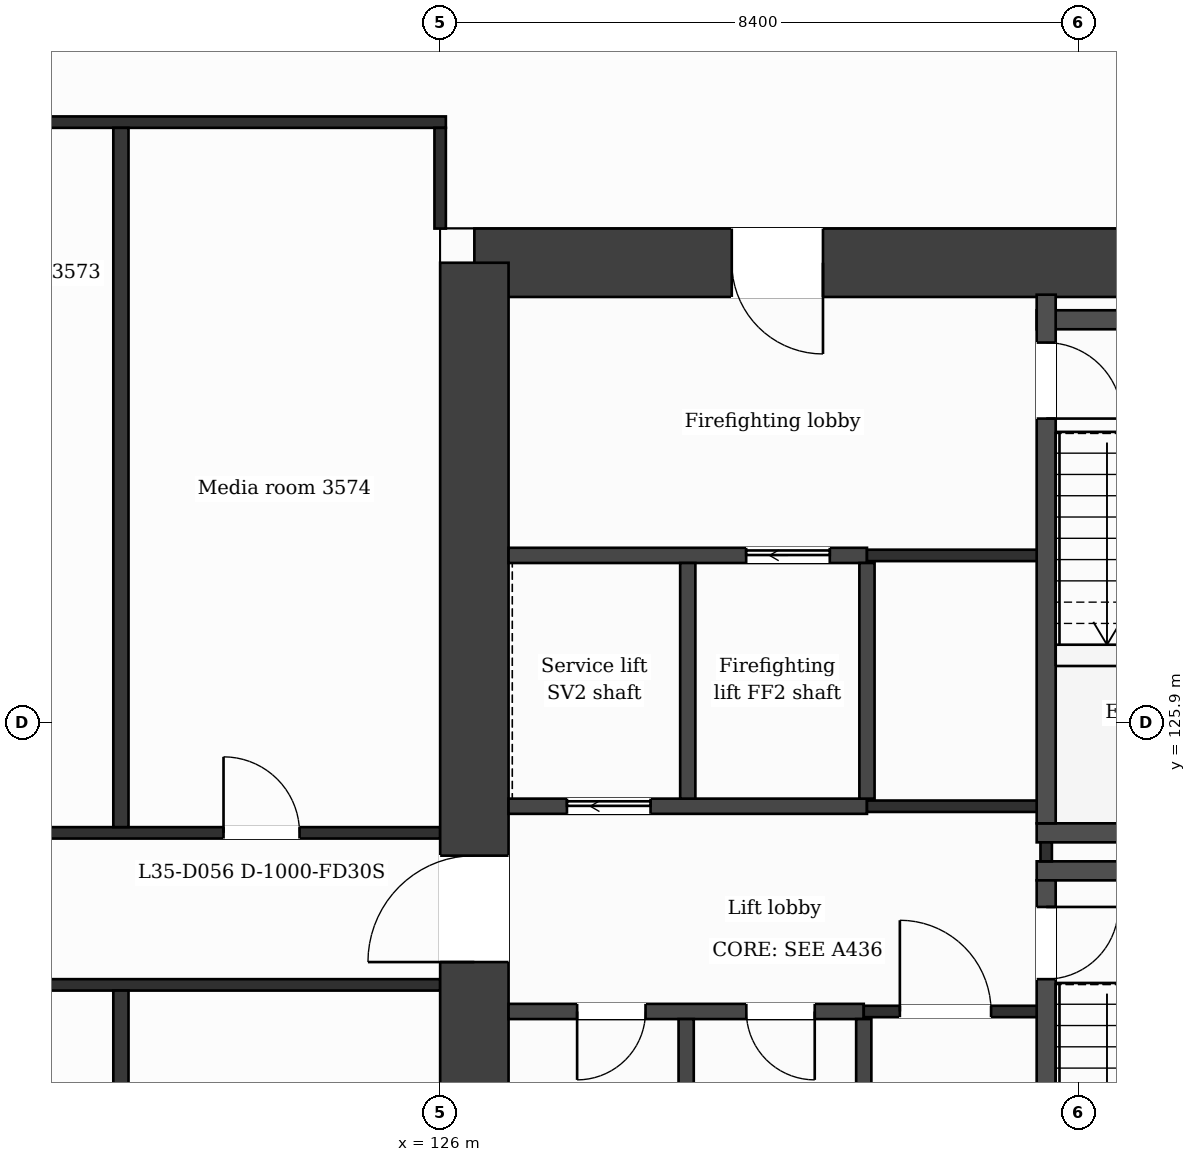
"""IFC4 building model, lengths in metres.
Left out: names, types, materials, properties, quantities, classifications, styles, units other than length and angle.
Written with IfcOpenShell. Run it as: python <this file> out.ifc"""

import sys

from ifc_helpers import new_model, si_unit, direction, frame, frame_2d, origin, place, context, subcontext, project, spatial, rectangle, extrude, element, fill, save


model = new_model("IFC4")
c1 = context("Model", 3, precision=1e-05, world=origin(), true_north=direction((0.0, 1.0)))
c2 = subcontext(c1, "Body", "Model", "MODEL_VIEW")
j1 = project(units=[si_unit("LENGTHUNIT", "METRE"), si_unit("PLANEANGLEUNIT", "RADIAN")], contexts=[c1])
p1 = place(None, origin())
s1 = spatial("IfcSite", under=j1, at=p1, CompositionType="ELEMENT")
p2 = place(p1, origin())
s2 = spatial("IfcBuilding", under=s1, at=p2, CompositionType="ELEMENT")
p3 = place(p2, frame((0.0, 0.0, 151.5)))
s3 = spatial("IfcBuildingStorey", under=s2, at=p3, CompositionType="ELEMENT", Elevation=151.5)
p4 = place(p3, frame((126.45, 131.95, 0.0), z_axis=(0.0, 0.0, 1.0), x_axis=(1.0, 0.0, 0.0)))
e1 = element("IfcWall", 1, at=p4, inside=s3, PredefinedType="SHEAR", context=c2, shape_type="SweptSolid", body=[
    extrude(rectangle(XDim=11.326, YDim=0.9, at=frame_2d((5.663, 0.0))), origin(), (0.0, 0.0, 1.0), 3.7),
])
p5 = place(p4, frame((3.386, 0.0, 0.0)))
e2 = element("IfcOpeningElement", 2, at=p5, cuts=e1, PredefinedType="OPENING", context=c2, shape_type="SweptSolid", body=[
    extrude(rectangle(XDim=1.2, YDim=2.1, at=frame_2d((0.6, 1.05))), frame((0.0, 0.46, 0.0), z_axis=(0.0, -1.0, 0.0), x_axis=(1.0, 0.0, 0.0)), (0.0, 0.0, 1.0), 0.92),
])
p6 = place(p3, frame((126.45, 110.85, 0.0), z_axis=(0.0, 0.0, 1.0), x_axis=(0.0, 1.0, 0.0)))
e3 = element("IfcWall", 3, at=p6, inside=s3, PredefinedType="SHEAR", context=c2, shape_type="SweptSolid", body=[
    extrude(rectangle(XDim=21.1, YDim=0.9, at=frame_2d((10.55, 0.0))), origin(), (0.0, 0.0, 1.0), 3.7),
])
p7 = place(p6, frame((11.9, 0.0, 0.0)))
e4 = element("IfcOpeningElement", 4, at=p7, cuts=e3, PredefinedType="OPENING", context=c2, shape_type="SweptSolid", body=[
    extrude(rectangle(XDim=1.4, YDim=2.1, at=frame_2d((0.7, 1.05))), frame((0.0, 0.46, 0.0), z_axis=(0.0, -1.0, 0.0), x_axis=(1.0, 0.0, 0.0)), (0.0, 0.0, 1.0), 0.92),
])
p8 = place(p3, frame((126.9, 122.1, 0.0), z_axis=(0.0, 0.0, 1.0), x_axis=(1.0, 0.0, 0.0)))
e5 = element("IfcWall", 5, at=p8, inside=s3, PredefinedType="PARTITIONING", context=c2, shape_type="SweptSolid", body=[
    extrude(rectangle(XDim=4.673, YDim=0.2, at=frame_2d((2.336, 0.0))), origin(), (0.0, 0.0, 1.0), 3.38),
])
p9 = place(p8, frame((3.128, 0.0, 0.0)))
e6 = element("IfcOpeningElement", 6, at=p9, cuts=e5, PredefinedType="OPENING", context=c2, shape_type="SweptSolid", body=[
    extrude(rectangle(XDim=0.9, YDim=2.1, at=frame_2d((0.45, 1.05))), frame((0.0, 0.11, 0.0), z_axis=(0.0, -1.0, 0.0), x_axis=(1.0, 0.0, 0.0)), (0.0, 0.0, 1.0), 0.22),
])
p10 = place(p8, frame((0.902, 0.0, 0.0)))
e7 = element("IfcOpeningElement", 7, at=p10, cuts=e5, PredefinedType="OPENING", context=c2, shape_type="SweptSolid", body=[
    extrude(rectangle(XDim=0.9, YDim=2.1, at=frame_2d((0.45, 1.05))), frame((0.0, 0.11, 0.0), z_axis=(0.0, -1.0, 0.0), x_axis=(1.0, 0.0, 0.0)), (0.0, 0.0, 1.0), 0.22),
])
p11 = place(p3, frame((131.573, 122.1, 0.0), z_axis=(0.0, 0.0, 1.0), x_axis=(1.0, 0.0, 0.0)))
e8 = element("IfcWall", 8, at=p11, inside=s3, PredefinedType="PARTITIONING", context=c2, shape_type="SweptSolid", body=[
    extrude(rectangle(XDim=2.4, YDim=0.15, at=frame_2d((1.2, 0.0))), origin(), (0.0, 0.0, 1.0), 3.38),
])
p12 = place(p11, frame((0.475, 0.0, 0.0)))
e9 = element("IfcOpeningElement", 9, at=p12, cuts=e8, PredefinedType="OPENING", context=c2, shape_type="SweptSolid", body=[
    extrude(rectangle(XDim=1.2, YDim=2.1, at=frame_2d((0.6, 1.05))), frame((0.0, 0.085, 0.0), z_axis=(0.0, -1.0, 0.0), x_axis=(1.0, 0.0, 0.0)), (0.0, 0.0, 1.0), 0.17),
])
p13 = place(p3, frame((100.8, 122.45, 0.0), z_axis=(0.0, 0.0, 1.0), x_axis=(1.0, 0.0, 0.0)))
e10 = element("IfcWall", 10, at=p13, inside=s3, PredefinedType="PARTITIONING", context=c2, shape_type="SweptSolid", body=[
    extrude(rectangle(XDim=25.2, YDim=0.15, at=frame_2d((12.6, 0.0))), origin(), (0.0, 0.0, 1.0), 3.38),
])
for number, where, z_axis, x_axis in (
    (11, (133.848, 123.95, 0.0), (0.0, 0.0, 1.0), (1.0, 0.0, 0.0)),
    (12, (133.848, 124.45, 0.0), (0.0, 0.0, 1.0), (1.0, 0.0, 0.0)),
):
    element("IfcWall", number, at=place(p3, frame(where, z_axis=z_axis, x_axis=x_axis)), inside=s3, PredefinedType="PARTITIONING", context=c2, shape_type="SweptSolid", body=[
        extrude(rectangle(XDim=3.4, YDim=0.25, at=frame_2d((1.7, 0.0))), origin(), (0.0, 0.0, 1.0), 3.38),
    ])
p14 = place(p3, frame((100.8, 124.45, 0.0), z_axis=(0.0, 0.0, 1.0), x_axis=(1.0, 0.0, 0.0)))
e13 = element("IfcWall", 13, at=p14, inside=s3, PredefinedType="PARTITIONING", context=c2, shape_type="SweptSolid", body=[
    extrude(rectangle(XDim=25.2, YDim=0.15, at=frame_2d((12.6, 0.0))), origin(), (0.0, 0.0, 1.0), 3.38),
])
p15 = place(p14, frame((3.03, 0.0, 0.0)))
e14 = element("IfcOpeningElement", 14, at=p15, cuts=e13, PredefinedType="OPENING", context=c2, shape_type="SweptSolid", body=[
    extrude(rectangle(XDim=1.0, YDim=2.1, at=frame_2d((0.5, 1.05))), frame((0.0, 0.085, 0.0), z_axis=(0.0, -1.0, 0.0), x_axis=(1.0, 0.0, 0.0)), (0.0, 0.0, 1.0), 0.17),
])
p16 = place(p14, frame((12.77, 0.0, 0.0)))
e15 = element("IfcOpeningElement", 15, at=p16, cuts=e13, PredefinedType="OPENING", context=c2, shape_type="SweptSolid", body=[
    extrude(rectangle(XDim=1.0, YDim=2.1, at=frame_2d((0.5, 1.05))), frame((0.0, 0.085, 0.0), z_axis=(0.0, -1.0, 0.0), x_axis=(1.0, 0.0, 0.0)), (0.0, 0.0, 1.0), 0.17),
])
p17 = place(p14, frame((17.67, 0.0, 0.0)))
e16 = element("IfcOpeningElement", 16, at=p17, cuts=e13, PredefinedType="OPENING", context=c2, shape_type="SweptSolid", body=[
    extrude(rectangle(XDim=1.0, YDim=2.1, at=frame_2d((0.5, 1.05))), frame((0.0, 0.085, 0.0), z_axis=(0.0, -1.0, 0.0), x_axis=(1.0, 0.0, 0.0)), (0.0, 0.0, 1.0), 0.17),
])
p18 = place(p14, frame((22.35, 0.0, 0.0)))
e17 = element("IfcOpeningElement", 17, at=p18, cuts=e13, PredefinedType="OPENING", context=c2, shape_type="SweptSolid", body=[
    extrude(rectangle(XDim=1.0, YDim=2.1, at=frame_2d((0.5, 1.05))), frame((0.0, 0.085, 0.0), z_axis=(0.0, -1.0, 0.0), x_axis=(1.0, 0.0, 0.0)), (0.0, 0.0, 1.0), 0.17),
])
p19 = place(p3, frame((126.9, 124.8, 0.0), z_axis=(0.0, 0.0, 1.0), x_axis=(1.0, 0.0, 0.0)))
e18 = element("IfcWall", 18, at=p19, inside=s3, PredefinedType="PARTITIONING", context=c2, shape_type="SweptSolid", body=[
    extrude(rectangle(XDim=4.715, YDim=0.2, at=frame_2d((2.358, 0.0))), origin(), (0.0, 0.0, 1.0), 3.38),
])
p20 = place(p19, frame((0.768, 0.0, 0.0)))
e19 = element("IfcOpeningElement", 19, at=p20, cuts=e18, PredefinedType="OPENING", context=c2, shape_type="SweptSolid", body=[
    extrude(rectangle(XDim=1.1, YDim=2.1, at=frame_2d((0.55, 1.05))), frame((0.0, 0.11, 0.0), z_axis=(0.0, -1.0, 0.0), x_axis=(1.0, 0.0, 0.0)), (0.0, 0.0, 1.0), 0.22),
])
p21 = place(p3, frame((131.615, 124.8, 0.0), z_axis=(0.0, 0.0, 1.0), x_axis=(1.0, 0.0, 0.0)))
e20 = element("IfcWall", 20, at=p21, inside=s3, PredefinedType="PARTITIONING", context=c2, shape_type="SweptSolid", body=[
    extrude(rectangle(XDim=2.483, YDim=0.15, at=frame_2d((1.241, 0.0))), origin(), (0.0, 0.0, 1.0), 3.38),
])
p22 = place(p3, frame((126.9, 128.1, 0.0), z_axis=(0.0, 0.0, 1.0), x_axis=(1.0, 0.0, 0.0)))
e21 = element("IfcWall", 21, at=p22, inside=s3, PredefinedType="PARTITIONING", context=c2, shape_type="SweptSolid", body=[
    extrude(rectangle(XDim=4.715, YDim=0.2, at=frame_2d((2.358, 0.0))), origin(), (0.0, 0.0, 1.0), 3.38),
])
p23 = place(p22, frame((3.126, 0.0, 0.0)))
e22 = element("IfcOpeningElement", 22, at=p23, cuts=e21, PredefinedType="OPENING", context=c2, shape_type="SweptSolid", body=[
    extrude(rectangle(XDim=1.1, YDim=2.1, at=frame_2d((0.55, 1.05))), frame((0.0, 0.11, 0.0), z_axis=(0.0, -1.0, 0.0), x_axis=(1.0, 0.0, 0.0)), (0.0, 0.0, 1.0), 0.22),
])
p24 = place(p3, frame((131.615, 128.1, 0.0), z_axis=(0.0, 0.0, 1.0), x_axis=(1.0, 0.0, 0.0)))
e23 = element("IfcWall", 23, at=p24, inside=s3, PredefinedType="PARTITIONING", context=c2, shape_type="SweptSolid", body=[
    extrude(rectangle(XDim=2.358, YDim=0.15, at=frame_2d((1.179, 0.0))), origin(), (0.0, 0.0, 1.0), 3.38),
])
p25 = place(p3, frame((133.848, 131.2, 0.0), z_axis=(0.0, 0.0, 1.0), x_axis=(1.0, 0.0, 0.0)))
e24 = element("IfcWall", 24, at=p25, inside=s3, PredefinedType="PARTITIONING", context=c2, shape_type="SweptSolid", body=[
    extrude(rectangle(XDim=3.605, YDim=0.25, at=frame_2d((1.802, 0.0))), origin(), (0.0, 0.0, 1.0), 3.38),
])
p26 = place(p3, frame((100.725, 133.8, 0.0), z_axis=(0.0, 0.0, 1.0), x_axis=(1.0, 0.0, 0.0)))
e25 = element("IfcWall", 25, at=p26, inside=s3, PredefinedType="PARTITIONING", context=c2, shape_type="SweptSolid", body=[
    extrude(rectangle(XDim=25.35, YDim=0.15, at=frame_2d((12.675, 0.0))), origin(), (0.0, 0.0, 1.0), 3.38),
])
p27 = place(p26, frame((17.85, 0.0, 0.0)))
e26 = element("IfcOpeningElement", 26, at=p27, cuts=e25, PredefinedType="OPENING", context=c2, shape_type="SweptSolid", body=[
    extrude(rectangle(XDim=1.0, YDim=2.1, at=frame_2d((0.5, 1.05))), frame((0.0, 0.085, 0.0), z_axis=(0.0, -1.0, 0.0), x_axis=(1.0, 0.0, 0.0)), (0.0, 0.0, 1.0), 0.17),
])
p28 = place(p3, frame((121.8, 109.075, 0.0), z_axis=(0.0, 0.0, 1.0), x_axis=(0.0, 1.0, 0.0)))
e27 = element("IfcWall", 27, at=p28, inside=s3, PredefinedType="PARTITIONING", context=c2, shape_type="SweptSolid", body=[
    extrude(rectangle(XDim=13.3, YDim=0.2, at=frame_2d((6.65, 0.0))), origin(), (0.0, 0.0, 1.0), 3.38),
])
p29 = place(p3, frame((121.8, 124.525, 0.0), z_axis=(0.0, 0.0, 1.0), x_axis=(0.0, 1.0, 0.0)))
e28 = element("IfcWall", 28, at=p29, inside=s3, PredefinedType="PARTITIONING", context=c2, shape_type="SweptSolid", body=[
    extrude(rectangle(XDim=9.2, YDim=0.2, at=frame_2d((4.6, 0.0))), origin(), (0.0, 0.0, 1.0), 3.38),
])
p30 = place(p3, frame((126.0, 132.4, 0.0), z_axis=(0.0, 0.0, 1.0), x_axis=(0.0, 1.0, 0.0)))
e29 = element("IfcWall", 29, at=p30, inside=s3, PredefinedType="PARTITIONING", context=c2, shape_type="SweptSolid", body=[
    extrude(rectangle(XDim=1.325, YDim=0.15, at=frame_2d((0.663, 0.0))), origin(), (0.0, 0.0, 1.0), 3.38),
])
for number, where, z_axis, x_axis in (
    (30, (129.237, 118.9, 0.0), (0.0, 0.0, 1.0), (0.0, 1.0, 0.0)),
    (31, (129.258, 124.9, 0.0), (0.0, 0.0, 1.0), (0.0, 1.0, 0.0)),
):
    element("IfcWall", number, at=place(p3, frame(where, z_axis=z_axis, x_axis=x_axis)), inside=s3, PredefinedType="PARTITIONING", context=c2, shape_type="SweptSolid", body=[
        extrude(rectangle(XDim=3.1, YDim=0.2, at=frame_2d((1.55, 0.0))), origin(), (0.0, 0.0, 1.0), 3.38),
    ])
p31 = place(p3, frame((131.573, 116.87, 0.0), z_axis=(0.0, 0.0, 1.0), x_axis=(0.0, 1.0, 0.0)))
e32 = element("IfcWall", 32, at=p31, inside=s3, PredefinedType="PARTITIONING", context=c2, shape_type="SweptSolid", body=[
    extrude(rectangle(XDim=5.13, YDim=0.2, at=frame_2d((2.565, 0.0))), origin(), (0.0, 0.0, 1.0), 3.38),
])
p32 = place(p31, frame((0.68, 0.0, 0.0)))
e33 = element("IfcOpeningElement", 33, at=p32, cuts=e32, PredefinedType="OPENING", context=c2, shape_type="SweptSolid", body=[
    extrude(rectangle(XDim=0.9, YDim=2.1, at=frame_2d((0.45, 1.05))), frame((0.0, 0.11, 0.0), z_axis=(0.0, -1.0, 0.0), x_axis=(1.0, 0.0, 0.0)), (0.0, 0.0, 1.0), 0.22),
])
p33 = place(p3, frame((131.615, 124.9, 0.0), z_axis=(0.0, 0.0, 1.0), x_axis=(0.0, 1.0, 0.0)))
e34 = element("IfcWall", 34, at=p33, inside=s3, PredefinedType="PARTITIONING", context=c2, shape_type="SweptSolid", body=[
    extrude(rectangle(XDim=3.1, YDim=0.2, at=frame_2d((1.55, 0.0))), origin(), (0.0, 0.0, 1.0), 3.38),
])
p34 = place(p3, frame((133.973, 124.075, 0.0), z_axis=(0.0, 0.0, 1.0), x_axis=(0.0, 1.0, 0.0)))
e35 = element("IfcWall", 35, at=p34, inside=s3, PredefinedType="PARTITIONING", context=c2, shape_type="SweptSolid", body=[
    extrude(rectangle(XDim=0.25, YDim=0.15, at=frame_2d((0.125, 0.0))), origin(), (0.0, 0.0, 1.0), 3.38),
])
p35 = place(p3, frame((133.973, 116.87, 0.0), z_axis=(0.0, 0.0, 1.0), x_axis=(0.0, 1.0, 0.0)))
e36 = element("IfcWall", 36, at=p35, inside=s3, PredefinedType="PARTITIONING", context=c2, shape_type="SweptSolid", body=[
    extrude(rectangle(XDim=6.955, YDim=0.25, at=frame_2d((3.478, 0.0))), origin(), (0.0, 0.0, 1.0), 3.38),
])
p36 = place(p35, frame((5.655, 0.0, 0.0)))
e37 = element("IfcOpeningElement", 37, at=p36, cuts=e36, PredefinedType="OPENING", context=c2, shape_type="SweptSolid", body=[
    extrude(rectangle(XDim=0.95, YDim=2.1, at=frame_2d((0.475, 1.05))), frame((0.0, 0.135, 0.0), z_axis=(0.0, -1.0, 0.0), x_axis=(1.0, 0.0, 0.0)), (0.0, 0.0, 1.0), 0.27),
])
p37 = place(p3, frame((133.973, 124.575, 0.0), z_axis=(0.0, 0.0, 1.0), x_axis=(0.0, 1.0, 0.0)))
e38 = element("IfcWall", 38, at=p37, inside=s3, PredefinedType="PARTITIONING", context=c2, shape_type="SweptSolid", body=[
    extrude(rectangle(XDim=6.955, YDim=0.25, at=frame_2d((3.478, 0.0))), origin(), (0.0, 0.0, 1.0), 3.38),
])
p38 = place(p37, frame((5.325, 0.0, 0.0)))
e39 = element("IfcOpeningElement", 39, at=p38, cuts=e38, PredefinedType="OPENING", context=c2, shape_type="SweptSolid", body=[
    extrude(rectangle(XDim=1.0, YDim=2.1, at=frame_2d((0.5, 1.05))), frame((0.0, 0.135, 0.0), z_axis=(0.0, -1.0, 0.0), x_axis=(1.0, 0.0, 0.0)), (0.0, 0.0, 1.0), 0.27),
])
p39 = place(p12, origin())
e40 = element("IfcDoor", 40, at=p39, inside=s3, OperationType="SINGLE_SWING_LEFT", PredefinedType="DOOR", context=c2, shape_type="SweptSolid", body=[
    extrude(rectangle(XDim=1.2, YDim=2.1, at=frame_2d((0.6, 1.05))), frame((0.0, 0.025, 0.0), z_axis=(0.0, -1.0, 0.0), x_axis=(1.0, 0.0, 0.0)), (0.0, 0.0, 1.0), 0.05),
])
fill(e9, e40)
p40 = place(p23, origin())
e41 = element("IfcDoor", 41, at=p40, inside=s3, OperationType="SLIDING_TO_LEFT", PredefinedType="DOOR", context=c2, shape_type="SweptSolid", body=[
    extrude(rectangle(XDim=1.1, YDim=2.1, at=frame_2d((0.55, 1.05))), frame((0.0, 0.025, 0.0), z_axis=(0.0, -1.0, 0.0), x_axis=(1.0, 0.0, 0.0)), (0.0, 0.0, 1.0), 0.05),
])
fill(e22, e41)
p41 = place(p20, origin())
e42 = element("IfcDoor", 42, at=p41, inside=s3, OperationType="SLIDING_TO_LEFT", PredefinedType="DOOR", context=c2, shape_type="SweptSolid", body=[
    extrude(rectangle(XDim=1.1, YDim=2.1, at=frame_2d((0.55, 1.05))), frame((0.0, 0.025, 0.0), z_axis=(0.0, -1.0, 0.0), x_axis=(1.0, 0.0, 0.0)), (0.0, 0.0, 1.0), 0.05),
])
fill(e19, e42)
p42 = place(p9, origin())
e43 = element("IfcDoor", 43, at=p42, inside=s3, OperationType="SINGLE_SWING_RIGHT", PredefinedType="DOOR", context=c2, shape_type="SweptSolid", body=[
    extrude(rectangle(XDim=0.9, YDim=2.1, at=frame_2d((0.45, 1.05))), frame((0.0, 0.025, 0.0), z_axis=(0.0, -1.0, 0.0), x_axis=(1.0, 0.0, 0.0)), (0.0, 0.0, 1.0), 0.05),
])
fill(e6, e43)
p43 = place(p10, origin())
e44 = element("IfcDoor", 44, at=p43, inside=s3, OperationType="SINGLE_SWING_LEFT", PredefinedType="DOOR", context=c2, shape_type="SweptSolid", body=[
    extrude(rectangle(XDim=0.9, YDim=2.1, at=frame_2d((0.45, 1.05))), frame((0.0, 0.025, 0.0), z_axis=(0.0, -1.0, 0.0), x_axis=(1.0, 0.0, 0.0)), (0.0, 0.0, 1.0), 0.05),
])
fill(e7, e44)
p44 = place(p36, origin())
e45 = element("IfcDoor", 45, at=p44, inside=s3, OperationType="SINGLE_SWING_RIGHT", PredefinedType="DOOR", context=c2, shape_type="SweptSolid", body=[
    extrude(rectangle(XDim=0.95, YDim=2.1, at=frame_2d((0.475, 1.05))), frame((0.0, 0.025, 0.0), z_axis=(0.0, -1.0, 0.0), x_axis=(1.0, 0.0, 0.0)), (0.0, 0.0, 1.0), 0.05),
])
fill(e37, e45)
p45 = place(p38, origin())
e46 = element("IfcDoor", 46, at=p45, inside=s3, OperationType="SINGLE_SWING_LEFT", PredefinedType="DOOR", context=c2, shape_type="SweptSolid", body=[
    extrude(rectangle(XDim=1.0, YDim=2.1, at=frame_2d((0.5, 1.05))), frame((0.0, 0.025, 0.0), z_axis=(0.0, -1.0, 0.0), x_axis=(1.0, 0.0, 0.0)), (0.0, 0.0, 1.0), 0.05),
])
fill(e39, e46)
p46 = place(p18, origin())
e47 = element("IfcDoor", 47, at=p46, inside=s3, OperationType="SINGLE_SWING_LEFT", PredefinedType="DOOR", context=c2, shape_type="SweptSolid", body=[
    extrude(rectangle(XDim=1.0, YDim=2.1, at=frame_2d((0.5, 1.05))), frame((0.0, 0.025, 0.0), z_axis=(0.0, -1.0, 0.0), x_axis=(1.0, 0.0, 0.0)), (0.0, 0.0, 1.0), 0.05),
])
fill(e17, e47)
p47 = place(p5, origin())
e48 = element("IfcDoor", 48, at=p47, inside=s3, OperationType="SINGLE_SWING_RIGHT", PredefinedType="DOOR", context=c2, shape_type="SweptSolid", body=[
    extrude(rectangle(XDim=1.2, YDim=2.1, at=frame_2d((0.6, 1.05))), frame((0.0, 0.025, 0.0), z_axis=(0.0, -1.0, 0.0), x_axis=(1.0, 0.0, 0.0)), (0.0, 0.0, 1.0), 0.05),
])
fill(e2, e48)
p48 = place(p7, origin())
e49 = element("IfcDoor", 49, at=p48, inside=s3, OperationType="SINGLE_SWING_LEFT", PredefinedType="DOOR", context=c2, shape_type="SweptSolid", body=[
    extrude(rectangle(XDim=1.4, YDim=2.1, at=frame_2d((0.7, 1.05))), frame((0.0, 0.025, 0.0), z_axis=(0.0, -1.0, 0.0), x_axis=(1.0, 0.0, 0.0)), (0.0, 0.0, 1.0), 0.05),
])
fill(e4, e49)
save(model, sys.argv[1])
